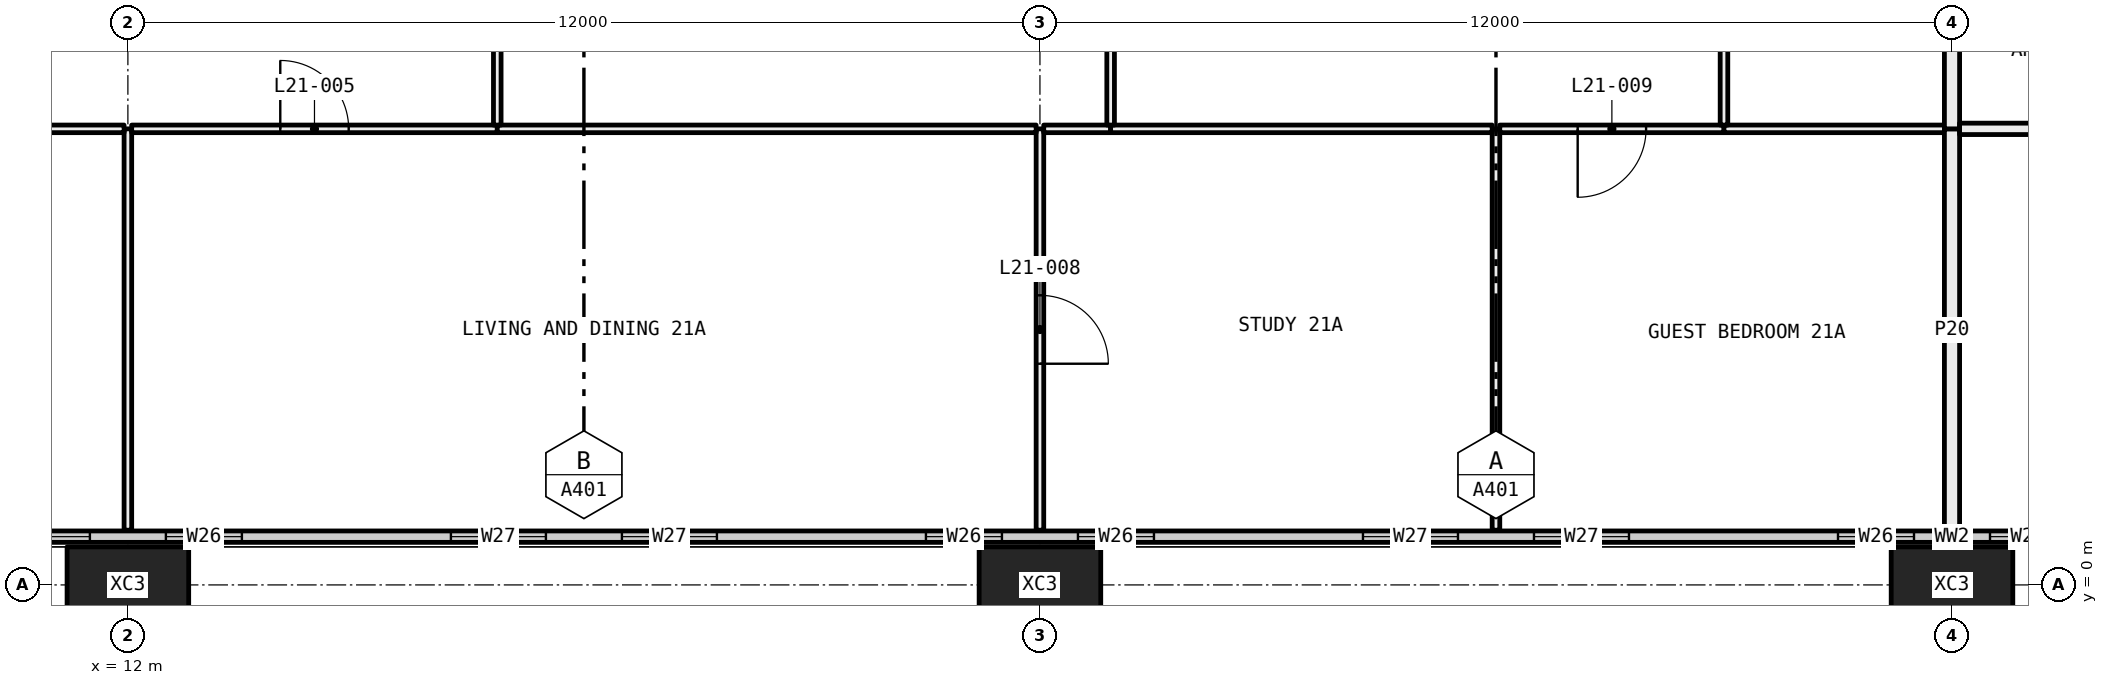
"""IFC4 building model, lengths in metres.
Left out: names, types, materials, properties, quantities, classifications, styles, units other than length and angle.
Written with IfcOpenShell. Run it as: python <this file> out.ifc"""

import sys

from ifc_helpers import new_model, si_unit, direction, frame, frame_2d, origin, origin_2d, place, context, subcontext, project, spatial, rectangle, hollow_rectangle, extrude, element, fill, save


model = new_model("IFC4")
c1 = context("Model", 3, precision=1e-05, world=origin(), true_north=direction((0.0, 1.0)))
c2 = subcontext(c1, "Body", "Model", "MODEL_VIEW")
j1 = project(units=[si_unit("LENGTHUNIT", "METRE"), si_unit("PLANEANGLEUNIT", "RADIAN")], contexts=[c1])
p1 = place(None, origin())
s1 = spatial("IfcSite", under=j1, at=p1, CompositionType="ELEMENT")
p2 = place(p1, origin())
s2 = spatial("IfcBuilding", under=s1, at=p2, CompositionType="ELEMENT")
p3 = place(p2, frame((0.0, 0.0, 85.2)))
s3 = spatial("IfcBuildingStorey", under=s2, at=p3, CompositionType="ELEMENT", Elevation=85.2)
for number, where, z_axis, x_axis in (
    (1, (12.0, 0.0, -0.4), (0.0, 0.0, 1.0), (1.0, 0.0, 0.0)),
    (2, (24.0, 0.0, -0.4), (0.0, 0.0, 1.0), (1.0, 0.0, 0.0)),
    (3, (36.0, 0.0, -0.4), (0.0, 0.0, 1.0), (1.0, 0.0, 0.0)),
):
    element("IfcColumn", number, at=place(p3, frame(where, z_axis=z_axis, x_axis=x_axis)), inside=s3, PredefinedType="COLUMN", context=c2, shape_type="SweptSolid", body=[
        extrude(hollow_rectangle(XDim=1.6, YDim=1.0, WallThickness=0.065, at=origin_2d()), origin(), (0.0, 0.0, 1.0), 3.45),
    ])
p4 = place(p3, frame((6.56, 0.635, 0.0), z_axis=(0.0, 0.0, 1.0), x_axis=(1.0, 0.0, 0.0)))
e4 = element("IfcWall", 4, at=p4, inside=s3, PredefinedType="ELEMENTEDWALL", context=c2, shape_type="SweptSolid", body=[
    extrude(rectangle(XDim=58.88, YDim=0.15, at=frame_2d((29.44, 0.0))), origin(), (0.0, 0.0, 1.0), 3.05),
])
p5 = place(p4, frame((0.44, 0.0, 0.45)))
e5 = element("IfcOpeningElement", 5, at=p5, cuts=e4, PredefinedType="OPENING", context=c2, shape_type="SweptSolid", body=[
    extrude(rectangle(XDim=4.5, YDim=2.55, at=frame_2d((2.25, 1.275))), frame((0.0, 0.085, 0.0), z_axis=(0.0, -1.0, 0.0), x_axis=(1.0, 0.0, 0.0)), (0.0, 0.0, 1.0), 0.17),
])
p6 = place(p4, frame((5.94, 0.0, 0.45)))
e6 = element("IfcOpeningElement", 6, at=p6, cuts=e4, PredefinedType="OPENING", context=c2, shape_type="SweptSolid", body=[
    extrude(rectangle(XDim=1.0, YDim=2.55, at=frame_2d((0.5, 1.275))), frame((0.0, 0.085, 0.0), z_axis=(0.0, -1.0, 0.0), x_axis=(1.0, 0.0, 0.0)), (0.0, 0.0, 1.0), 0.17),
])
p7 = place(p4, frame((9.69, 0.0, 0.45)))
e7 = element("IfcOpeningElement", 7, at=p7, cuts=e4, PredefinedType="OPENING", context=c2, shape_type="SweptSolid", body=[
    extrude(rectangle(XDim=1.25, YDim=2.55, at=frame_2d((0.625, 1.275))), frame((0.0, 0.085, 0.0), z_axis=(0.0, -1.0, 0.0), x_axis=(1.0, 0.0, 0.0)), (0.0, 0.0, 1.0), 0.17),
])
p8 = place(p4, frame((11.94, 0.0, 0.45)))
e8 = element("IfcOpeningElement", 8, at=p8, cuts=e4, PredefinedType="OPENING", context=c2, shape_type="SweptSolid", body=[
    extrude(rectangle(XDim=1.25, YDim=2.55, at=frame_2d((0.625, 1.275))), frame((0.0, 0.085, 0.0), z_axis=(0.0, -1.0, 0.0), x_axis=(1.0, 0.0, 0.0)), (0.0, 0.0, 1.0), 0.17),
])
p9 = place(p4, frame((15.94, 0.0, 0.45)))
e9 = element("IfcOpeningElement", 9, at=p9, cuts=e4, PredefinedType="OPENING", context=c2, shape_type="SweptSolid", body=[
    extrude(rectangle(XDim=1.0, YDim=2.55, at=frame_2d((0.5, 1.275))), frame((0.0, 0.085, 0.0), z_axis=(0.0, -1.0, 0.0), x_axis=(1.0, 0.0, 0.0)), (0.0, 0.0, 1.0), 0.17),
])
p10 = place(p4, frame((17.94, 0.0, 0.45)))
e10 = element("IfcOpeningElement", 10, at=p10, cuts=e4, PredefinedType="OPENING", context=c2, shape_type="SweptSolid", body=[
    extrude(rectangle(XDim=1.0, YDim=2.55, at=frame_2d((0.5, 1.275))), frame((0.0, 0.085, 0.0), z_axis=(0.0, -1.0, 0.0), x_axis=(1.0, 0.0, 0.0)), (0.0, 0.0, 1.0), 0.17),
])
p11 = place(p4, frame((21.69, 0.0, 0.45)))
e11 = element("IfcOpeningElement", 11, at=p11, cuts=e4, PredefinedType="OPENING", context=c2, shape_type="SweptSolid", body=[
    extrude(rectangle(XDim=1.25, YDim=2.55, at=frame_2d((0.625, 1.275))), frame((0.0, 0.085, 0.0), z_axis=(0.0, -1.0, 0.0), x_axis=(1.0, 0.0, 0.0)), (0.0, 0.0, 1.0), 0.17),
])
p12 = place(p4, frame((23.94, 0.0, 0.45)))
e12 = element("IfcOpeningElement", 12, at=p12, cuts=e4, PredefinedType="OPENING", context=c2, shape_type="SweptSolid", body=[
    extrude(rectangle(XDim=1.25, YDim=2.55, at=frame_2d((0.625, 1.275))), frame((0.0, 0.085, 0.0), z_axis=(0.0, -1.0, 0.0), x_axis=(1.0, 0.0, 0.0)), (0.0, 0.0, 1.0), 0.17),
])
p13 = place(p4, frame((27.94, 0.0, 0.45)))
e13 = element("IfcOpeningElement", 13, at=p13, cuts=e4, PredefinedType="OPENING", context=c2, shape_type="SweptSolid", body=[
    extrude(rectangle(XDim=1.0, YDim=2.55, at=frame_2d((0.5, 1.275))), frame((0.0, 0.085, 0.0), z_axis=(0.0, -1.0, 0.0), x_axis=(1.0, 0.0, 0.0)), (0.0, 0.0, 1.0), 0.17),
])
p14 = place(p4, frame((29.94, 0.0, 0.45)))
e14 = element("IfcOpeningElement", 14, at=p14, cuts=e4, PredefinedType="OPENING", context=c2, shape_type="SweptSolid", body=[
    extrude(rectangle(XDim=1.0, YDim=2.55, at=frame_2d((0.5, 1.275))), frame((0.0, 0.085, 0.0), z_axis=(0.0, -1.0, 0.0), x_axis=(1.0, 0.0, 0.0)), (0.0, 0.0, 1.0), 0.17),
])
p15 = place(p4, frame((33.69, 0.0, 0.45)))
e15 = element("IfcOpeningElement", 15, at=p15, cuts=e4, PredefinedType="OPENING", context=c2, shape_type="SweptSolid", body=[
    extrude(rectangle(XDim=1.25, YDim=2.55, at=frame_2d((0.625, 1.275))), frame((0.0, 0.085, 0.0), z_axis=(0.0, -1.0, 0.0), x_axis=(1.0, 0.0, 0.0)), (0.0, 0.0, 1.0), 0.17),
])
p16 = place(p4, frame((35.94, 0.0, 0.45)))
e16 = element("IfcOpeningElement", 16, at=p16, cuts=e4, PredefinedType="OPENING", context=c2, shape_type="SweptSolid", body=[
    extrude(rectangle(XDim=1.25, YDim=2.55, at=frame_2d((0.625, 1.275))), frame((0.0, 0.085, 0.0), z_axis=(0.0, -1.0, 0.0), x_axis=(1.0, 0.0, 0.0)), (0.0, 0.0, 1.0), 0.17),
])
p17 = place(p4, frame((39.94, 0.0, 0.45)))
e17 = element("IfcOpeningElement", 17, at=p17, cuts=e4, PredefinedType="OPENING", context=c2, shape_type="SweptSolid", body=[
    extrude(rectangle(XDim=1.0, YDim=2.55, at=frame_2d((0.5, 1.275))), frame((0.0, 0.085, 0.0), z_axis=(0.0, -1.0, 0.0), x_axis=(1.0, 0.0, 0.0)), (0.0, 0.0, 1.0), 0.17),
])
p18 = place(p4, frame((41.94, 0.0, 0.45)))
e18 = element("IfcOpeningElement", 18, at=p18, cuts=e4, PredefinedType="OPENING", context=c2, shape_type="SweptSolid", body=[
    extrude(rectangle(XDim=1.0, YDim=2.55, at=frame_2d((0.5, 1.275))), frame((0.0, 0.085, 0.0), z_axis=(0.0, -1.0, 0.0), x_axis=(1.0, 0.0, 0.0)), (0.0, 0.0, 1.0), 0.17),
])
p19 = place(p4, frame((45.69, 0.0, 0.45)))
e19 = element("IfcOpeningElement", 19, at=p19, cuts=e4, PredefinedType="OPENING", context=c2, shape_type="SweptSolid", body=[
    extrude(rectangle(XDim=1.25, YDim=2.55, at=frame_2d((0.625, 1.275))), frame((0.0, 0.085, 0.0), z_axis=(0.0, -1.0, 0.0), x_axis=(1.0, 0.0, 0.0)), (0.0, 0.0, 1.0), 0.17),
])
p20 = place(p4, frame((47.94, 0.0, 0.45)))
e20 = element("IfcOpeningElement", 20, at=p20, cuts=e4, PredefinedType="OPENING", context=c2, shape_type="SweptSolid", body=[
    extrude(rectangle(XDim=1.25, YDim=2.55, at=frame_2d((0.625, 1.275))), frame((0.0, 0.085, 0.0), z_axis=(0.0, -1.0, 0.0), x_axis=(1.0, 0.0, 0.0)), (0.0, 0.0, 1.0), 0.17),
])
p21 = place(p4, frame((51.94, 0.0, 0.45)))
e21 = element("IfcOpeningElement", 21, at=p21, cuts=e4, PredefinedType="OPENING", context=c2, shape_type="SweptSolid", body=[
    extrude(rectangle(XDim=1.0, YDim=2.55, at=frame_2d((0.5, 1.275))), frame((0.0, 0.085, 0.0), z_axis=(0.0, -1.0, 0.0), x_axis=(1.0, 0.0, 0.0)), (0.0, 0.0, 1.0), 0.17),
])
p22 = place(p4, frame((53.94, 0.0, 0.45)))
e22 = element("IfcOpeningElement", 22, at=p22, cuts=e4, PredefinedType="OPENING", context=c2, shape_type="SweptSolid", body=[
    extrude(rectangle(XDim=4.5, YDim=2.55, at=frame_2d((2.25, 1.275))), frame((0.0, 0.085, 0.0), z_axis=(0.0, -1.0, 0.0), x_axis=(1.0, 0.0, 0.0)), (0.0, 0.0, 1.0), 0.17),
])
p23 = place(p3, frame((12.0, 0.72, 0.0), z_axis=(0.0, 0.0, 1.0), x_axis=(0.0, 1.0, 0.0)))
e23 = element("IfcWall", 23, at=p23, inside=s3, PredefinedType="PARTITIONING", context=c2, shape_type="SweptSolid", body=[
    extrude(rectangle(XDim=5.28, YDim=0.1, at=frame_2d((2.64, 0.0))), origin(), (0.0, 0.0, 1.0), 2.45),
])
p24 = place(p3, frame((11.95, 6.0, 0.0), z_axis=(0.0, 0.0, 1.0), x_axis=(-1.0, 0.0, 0.0)))
e24 = element("IfcWall", 24, at=p24, inside=s3, PredefinedType="PARTITIONING", context=c2, shape_type="SweptSolid", body=[
    extrude(rectangle(XDim=3.16, YDim=0.1, at=frame_2d((1.58, 0.0))), origin(), (0.0, 0.0, 1.0), 2.45),
])
p25 = place(p24, frame((1.13, 0.0, 0.0)))
e25 = element("IfcOpeningElement", 25, at=p25, cuts=e24, PredefinedType="OPENING", context=c2, shape_type="SweptSolid", body=[
    extrude(rectangle(XDim=0.9, YDim=2.1, at=frame_2d((0.45, 1.05))), frame((0.0, 0.06, 0.0), z_axis=(0.0, -1.0, 0.0), x_axis=(1.0, 0.0, 0.0)), (0.0, 0.0, 1.0), 0.12),
])
p26 = place(p3, frame((24.0, 0.72, 0.0), z_axis=(0.0, 0.0, 1.0), x_axis=(0.0, 1.0, 0.0)))
e26 = element("IfcWall", 26, at=p26, inside=s3, PredefinedType="PARTITIONING", context=c2, shape_type="SweptSolid", body=[
    extrude(rectangle(XDim=5.28, YDim=0.1, at=frame_2d((2.64, 0.0))), origin(), (0.0, 0.0, 1.0), 2.45),
])
p27 = place(p26, frame((2.19, 0.0, 0.0)))
e27 = element("IfcOpeningElement", 27, at=p27, cuts=e26, PredefinedType="OPENING", context=c2, shape_type="SweptSolid", body=[
    extrude(rectangle(XDim=0.9, YDim=2.1, at=frame_2d((0.45, 1.05))), frame((0.0, 0.06, 0.0), z_axis=(0.0, -1.0, 0.0), x_axis=(1.0, 0.0, 0.0)), (0.0, 0.0, 1.0), 0.12),
])
p28 = place(p3, frame((16.86, 6.0, 0.0), z_axis=(0.0, 0.0, 1.0), x_axis=(-1.0, 0.0, 0.0)))
e28 = element("IfcWall", 28, at=p28, inside=s3, PredefinedType="PARTITIONING", context=c2, shape_type="SweptSolid", body=[
    extrude(rectangle(XDim=4.81, YDim=0.1, at=frame_2d((2.405, 0.0))), origin(), (0.0, 0.0, 1.0), 2.45),
])
p29 = place(p28, frame((1.955, 0.0, 0.0)))
e29 = element("IfcOpeningElement", 29, at=p29, cuts=e28, PredefinedType="OPENING", context=c2, shape_type="SweptSolid", body=[
    extrude(rectangle(XDim=0.9, YDim=2.1, at=frame_2d((0.45, 1.05))), frame((0.0, 0.06, 0.0), z_axis=(0.0, -1.0, 0.0), x_axis=(1.0, 0.0, 0.0)), (0.0, 0.0, 1.0), 0.12),
])
p30 = place(p3, frame((23.95, 6.0, 0.0), z_axis=(0.0, 0.0, 1.0), x_axis=(-1.0, 0.0, 0.0)))
e30 = element("IfcWall", 30, at=p30, inside=s3, PredefinedType="PARTITIONING", context=c2, shape_type="SweptSolid", body=[
    extrude(rectangle(XDim=7.09, YDim=0.1, at=frame_2d((3.545, 0.0))), origin(), (0.0, 0.0, 1.0), 2.45),
])
p31 = place(p3, frame((30.0, 0.72, 0.0), z_axis=(0.0, 0.0, 1.0), x_axis=(0.0, 1.0, 0.0)))
e31 = element("IfcWall", 31, at=p31, inside=s3, PredefinedType="PARTITIONING", context=c2, shape_type="SweptSolid", body=[
    extrude(rectangle(XDim=5.28, YDim=0.1, at=frame_2d((2.64, 0.0))), origin(), (0.0, 0.0, 1.0), 3.05),
])
p32 = place(p3, frame((24.93, 6.0, 0.0), z_axis=(0.0, 0.0, 1.0), x_axis=(-1.0, 0.0, 0.0)))
e32 = element("IfcWall", 32, at=p32, inside=s3, PredefinedType="PARTITIONING", context=c2, shape_type="SweptSolid", body=[
    extrude(rectangle(XDim=0.88, YDim=0.1, at=frame_2d((0.44, 0.0))), origin(), (0.0, 0.0, 1.0), 2.45),
])
p33 = place(p3, frame((29.95, 6.0, 0.0), z_axis=(0.0, 0.0, 1.0), x_axis=(-1.0, 0.0, 0.0)))
e33 = element("IfcWall", 33, at=p33, inside=s3, PredefinedType="PARTITIONING", context=c2, shape_type="SweptSolid", body=[
    extrude(rectangle(XDim=5.02, YDim=0.1, at=frame_2d((2.51, 0.0))), origin(), (0.0, 0.0, 1.0), 3.05),
])
p34 = place(p3, frame((33.0, 6.0, 0.0), z_axis=(0.0, 0.0, 1.0), x_axis=(-1.0, 0.0, 0.0)))
e34 = element("IfcWall", 34, at=p34, inside=s3, PredefinedType="PARTITIONING", context=c2, shape_type="SweptSolid", body=[
    extrude(rectangle(XDim=2.95, YDim=0.1, at=frame_2d((1.475, 0.0))), origin(), (0.0, 0.0, 1.0), 3.05),
])
p35 = place(p34, frame((1.025, 0.0, 0.0)))
e35 = element("IfcOpeningElement", 35, at=p35, cuts=e34, PredefinedType="OPENING", context=c2, shape_type="SweptSolid", body=[
    extrude(rectangle(XDim=0.9, YDim=2.1, at=frame_2d((0.45, 1.05))), frame((0.0, 0.06, 0.0), z_axis=(0.0, -1.0, 0.0), x_axis=(1.0, 0.0, 0.0)), (0.0, 0.0, 1.0), 0.12),
])
p36 = place(p3, frame((35.9, 6.0, 0.0), z_axis=(0.0, 0.0, 1.0), x_axis=(-1.0, 0.0, 0.0)))
e36 = element("IfcWall", 36, at=p36, inside=s3, PredefinedType="PARTITIONING", context=c2, shape_type="SweptSolid", body=[
    extrude(rectangle(XDim=2.9, YDim=0.1, at=frame_2d((1.45, 0.0))), origin(), (0.0, 0.0, 1.0), 3.05),
])
p37 = place(p3, frame((36.0, 0.72, 0.0), z_axis=(0.0, 0.0, 1.0), x_axis=(0.0, 1.0, 0.0)))
e37 = element("IfcWall", 37, at=p37, inside=s3, PredefinedType="PARTITIONING", context=c2, shape_type="SweptSolid", body=[
    extrude(rectangle(XDim=5.28, YDim=0.2, at=frame_2d((2.64, 0.0))), origin(), (0.0, 0.0, 1.0), 2.45),
])
p38 = place(p3, frame((16.86, 6.05, 0.0), z_axis=(0.0, 0.0, 1.0), x_axis=(0.0, 1.0, 0.0)))
e38 = element("IfcWall", 38, at=p38, inside=s3, PredefinedType="PARTITIONING", context=c2, shape_type="SweptSolid", body=[
    extrude(rectangle(XDim=5.95, YDim=0.1, at=frame_2d((2.975, 0.0))), origin(), (0.0, 0.0, 1.0), 2.45),
])
p39 = place(p3, frame((24.93, 6.05, 0.0), z_axis=(0.0, 0.0, 1.0), x_axis=(0.0, 1.0, 0.0)))
e39 = element("IfcWall", 39, at=p39, inside=s3, PredefinedType="PARTITIONING", context=c2, shape_type="SweptSolid", body=[
    extrude(rectangle(XDim=5.95, YDim=0.1, at=frame_2d((2.975, 0.0))), origin(), (0.0, 0.0, 1.0), 2.45),
])
p40 = place(p39, frame((2.525, 0.0, 0.0)))
e40 = element("IfcOpeningElement", 40, at=p40, cuts=e39, PredefinedType="OPENING", context=c2, shape_type="SweptSolid", body=[
    extrude(rectangle(XDim=0.9, YDim=2.1, at=frame_2d((0.45, 1.05))), frame((0.0, 0.06, 0.0), z_axis=(0.0, -1.0, 0.0), x_axis=(1.0, 0.0, 0.0)), (0.0, 0.0, 1.0), 0.12),
])
p41 = place(p3, frame((33.0, 6.05, 0.0), z_axis=(0.0, 0.0, 1.0), x_axis=(0.0, 1.0, 0.0)))
e41 = element("IfcWall", 41, at=p41, inside=s3, PredefinedType="PARTITIONING", context=c2, shape_type="SweptSolid", body=[
    extrude(rectangle(XDim=5.95, YDim=0.1, at=frame_2d((2.975, 0.0))), origin(), (0.0, 0.0, 1.0), 2.45),
])
p42 = place(p41, frame((2.525, 0.0, 0.0)))
e42 = element("IfcOpeningElement", 42, at=p42, cuts=e41, PredefinedType="OPENING", context=c2, shape_type="SweptSolid", body=[
    extrude(rectangle(XDim=0.9, YDim=2.1, at=frame_2d((0.45, 1.05))), frame((0.0, 0.06, 0.0), z_axis=(0.0, -1.0, 0.0), x_axis=(1.0, 0.0, 0.0)), (0.0, 0.0, 1.0), 0.12),
])
p43 = place(p3, frame((36.0, 6.0, 0.0), z_axis=(0.0, 0.0, 1.0), x_axis=(0.0, 1.0, 0.0)))
e43 = element("IfcWall", 43, at=p43, inside=s3, PredefinedType="PARTITIONING", context=c2, shape_type="SweptSolid", body=[
    extrude(rectangle(XDim=5.2, YDim=0.2, at=frame_2d((2.6, 0.0))), origin(), (0.0, 0.0, 1.0), 2.45),
])
p44 = place(p3, frame((39.0, 6.0, 0.0), z_axis=(0.0, 0.0, 1.0), x_axis=(-1.0, 0.0, 0.0)))
e44 = element("IfcWall", 44, at=p44, inside=s3, PredefinedType="PARTITIONING", context=c2, shape_type="SweptSolid", body=[
    extrude(rectangle(XDim=2.9, YDim=0.15, at=frame_2d((1.45, 0.0))), origin(), (0.0, 0.0, 1.0), 3.05),
])
p45 = place(p5, origin())
e45 = element("IfcWindow", 45, at=p45, inside=s3, PartitioningType="SINGLE_PANEL", PredefinedType="WINDOW", context=c2, shape_type="SweptSolid", body=[
    extrude(rectangle(XDim=4.5, YDim=2.55, at=frame_2d((2.25, 1.275))), frame((0.0, 0.03, 0.0), z_axis=(0.0, -1.0, 0.0), x_axis=(1.0, 0.0, 0.0)), (0.0, 0.0, 1.0), 0.06),
])
fill(e5, e45)
p46 = place(p6, origin())
e46 = element("IfcWindow", 46, at=p46, inside=s3, PartitioningType="SINGLE_PANEL", PredefinedType="WINDOW", context=c2, shape_type="SweptSolid", body=[
    extrude(rectangle(XDim=1.0, YDim=2.55, at=frame_2d((0.5, 1.275))), frame((0.0, 0.03, 0.0), z_axis=(0.0, -1.0, 0.0), x_axis=(1.0, 0.0, 0.0)), (0.0, 0.0, 1.0), 0.06),
])
fill(e6, e46)
p47 = place(p7, origin())
e47 = element("IfcWindow", 47, at=p47, inside=s3, PartitioningType="SINGLE_PANEL", PredefinedType="WINDOW", context=c2, shape_type="SweptSolid", body=[
    extrude(rectangle(XDim=1.25, YDim=2.55, at=frame_2d((0.625, 1.275))), frame((0.0, 0.03, 0.0), z_axis=(0.0, -1.0, 0.0), x_axis=(1.0, 0.0, 0.0)), (0.0, 0.0, 1.0), 0.06),
])
fill(e7, e47)
p48 = place(p8, origin())
e48 = element("IfcWindow", 48, at=p48, inside=s3, PartitioningType="SINGLE_PANEL", PredefinedType="WINDOW", context=c2, shape_type="SweptSolid", body=[
    extrude(rectangle(XDim=1.25, YDim=2.55, at=frame_2d((0.625, 1.275))), frame((0.0, 0.03, 0.0), z_axis=(0.0, -1.0, 0.0), x_axis=(1.0, 0.0, 0.0)), (0.0, 0.0, 1.0), 0.06),
])
fill(e8, e48)
p49 = place(p9, origin())
e49 = element("IfcWindow", 49, at=p49, inside=s3, PartitioningType="SINGLE_PANEL", PredefinedType="WINDOW", context=c2, shape_type="SweptSolid", body=[
    extrude(rectangle(XDim=1.0, YDim=2.55, at=frame_2d((0.5, 1.275))), frame((0.0, 0.03, 0.0), z_axis=(0.0, -1.0, 0.0), x_axis=(1.0, 0.0, 0.0)), (0.0, 0.0, 1.0), 0.06),
])
fill(e9, e49)
p50 = place(p10, origin())
e50 = element("IfcWindow", 50, at=p50, inside=s3, PartitioningType="SINGLE_PANEL", PredefinedType="WINDOW", context=c2, shape_type="SweptSolid", body=[
    extrude(rectangle(XDim=1.0, YDim=2.55, at=frame_2d((0.5, 1.275))), frame((0.0, 0.03, 0.0), z_axis=(0.0, -1.0, 0.0), x_axis=(1.0, 0.0, 0.0)), (0.0, 0.0, 1.0), 0.06),
])
fill(e10, e50)
p51 = place(p11, origin())
e51 = element("IfcWindow", 51, at=p51, inside=s3, PartitioningType="SINGLE_PANEL", PredefinedType="WINDOW", context=c2, shape_type="SweptSolid", body=[
    extrude(rectangle(XDim=1.25, YDim=2.55, at=frame_2d((0.625, 1.275))), frame((0.0, 0.03, 0.0), z_axis=(0.0, -1.0, 0.0), x_axis=(1.0, 0.0, 0.0)), (0.0, 0.0, 1.0), 0.06),
])
fill(e11, e51)
p52 = place(p12, origin())
e52 = element("IfcWindow", 52, at=p52, inside=s3, PartitioningType="SINGLE_PANEL", PredefinedType="WINDOW", context=c2, shape_type="SweptSolid", body=[
    extrude(rectangle(XDim=1.25, YDim=2.55, at=frame_2d((0.625, 1.275))), frame((0.0, 0.03, 0.0), z_axis=(0.0, -1.0, 0.0), x_axis=(1.0, 0.0, 0.0)), (0.0, 0.0, 1.0), 0.06),
])
fill(e12, e52)
p53 = place(p13, origin())
e53 = element("IfcWindow", 53, at=p53, inside=s3, PartitioningType="SINGLE_PANEL", PredefinedType="WINDOW", context=c2, shape_type="SweptSolid", body=[
    extrude(rectangle(XDim=1.0, YDim=2.55, at=frame_2d((0.5, 1.275))), frame((0.0, 0.03, 0.0), z_axis=(0.0, -1.0, 0.0), x_axis=(1.0, 0.0, 0.0)), (0.0, 0.0, 1.0), 0.06),
])
fill(e13, e53)
p54 = place(p14, origin())
e54 = element("IfcWindow", 54, at=p54, inside=s3, PartitioningType="SINGLE_PANEL", PredefinedType="WINDOW", context=c2, shape_type="SweptSolid", body=[
    extrude(rectangle(XDim=1.0, YDim=2.55, at=frame_2d((0.5, 1.275))), frame((0.0, 0.03, 0.0), z_axis=(0.0, -1.0, 0.0), x_axis=(1.0, 0.0, 0.0)), (0.0, 0.0, 1.0), 0.06),
])
fill(e14, e54)
p55 = place(p29, frame((0.9, 0.0, 0.0), x_axis=(-1.0, 0.0, 0.0)))
e55 = element("IfcDoor", 55, at=p55, inside=s3, OperationType="SINGLE_SWING_RIGHT", PredefinedType="DOOR", context=c2, shape_type="SweptSolid", body=[
    extrude(rectangle(XDim=0.9, YDim=2.1, at=frame_2d((0.45, 1.05))), frame((0.0, 0.025, 0.0), z_axis=(0.0, -1.0, 0.0), x_axis=(1.0, 0.0, 0.0)), (0.0, 0.0, 1.0), 0.05),
])
fill(e29, e55)
p56 = place(p27, frame((0.9, 0.0, 0.0), x_axis=(-1.0, 0.0, 0.0)))
e56 = element("IfcDoor", 56, at=p56, inside=s3, OperationType="SINGLE_SWING_LEFT", PredefinedType="DOOR", context=c2, shape_type="SweptSolid", body=[
    extrude(rectangle(XDim=0.9, YDim=2.1, at=frame_2d((0.45, 1.05))), frame((0.0, 0.025, 0.0), z_axis=(0.0, -1.0, 0.0), x_axis=(1.0, 0.0, 0.0)), (0.0, 0.0, 1.0), 0.05),
])
fill(e27, e56)
p57 = place(p35, origin())
e57 = element("IfcDoor", 57, at=p57, inside=s3, OperationType="SINGLE_SWING_LEFT", PredefinedType="DOOR", context=c2, shape_type="SweptSolid", body=[
    extrude(rectangle(XDim=0.9, YDim=2.1, at=frame_2d((0.45, 1.05))), frame((0.0, 0.025, 0.0), z_axis=(0.0, -1.0, 0.0), x_axis=(1.0, 0.0, 0.0)), (0.0, 0.0, 1.0), 0.05),
])
fill(e35, e57)
save(model, sys.argv[1])
